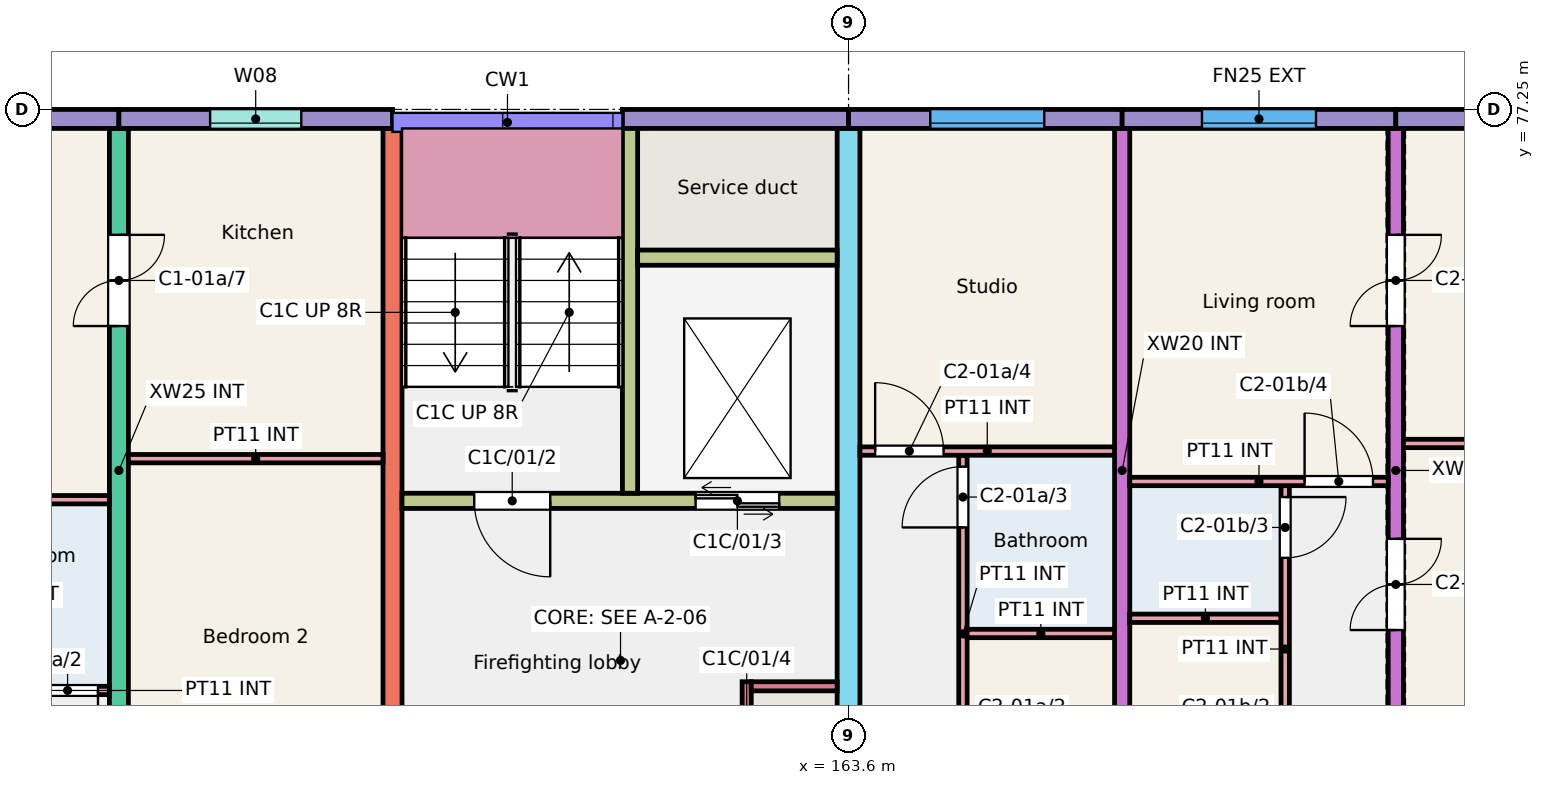
"""IFC4 building model, lengths in metres.
Left out: names, types, materials, properties, quantities, classifications, styles, units other than length and angle.
Written with IfcOpenShell. Run it as: python <this file> out.ifc"""

import sys

from ifc_helpers import new_model, si_unit, direction, frame, frame_2d, origin, place, context, subcontext, project, spatial, rectangle, extrude, element, fill, save


model = new_model("IFC4")
c1 = context("Model", 3, precision=1e-05, world=origin(), true_north=direction((0.0, 1.0)))
c2 = subcontext(c1, "Body", "Model", "MODEL_VIEW")
j1 = project(units=[si_unit("LENGTHUNIT", "METRE"), si_unit("PLANEANGLEUNIT", "RADIAN")], contexts=[c1])
p1 = place(None, origin())
s1 = spatial("IfcSite", under=j1, at=p1, CompositionType="ELEMENT")
p2 = place(p1, origin())
s2 = spatial("IfcBuilding", under=s1, at=p2, CompositionType="ELEMENT")
p3 = place(p2, frame((0.0, 0.0, 3.0)))
s3 = spatial("IfcBuildingStorey", under=s2, at=p3, CompositionType="ELEMENT", Elevation=3.0)
p4 = place(p3, frame((154.0, 68.0, 0.0), z_axis=(0.0, 0.0, 1.0), x_axis=(0.0, 1.0, 0.0)))
e1 = element("IfcWall", 1, at=p4, inside=s3, PredefinedType="SHEAR", context=c2, shape_type="SweptSolid", body=[
    extrude(rectangle(XDim=9.0, YDim=0.25, at=frame_2d((4.5, 0.0))), origin(), (0.0, 0.0, 1.0), 3.0),
])
p5 = place(p4, frame((0.175, 0.0, 0.0)))
e2 = element("IfcOpeningElement", 2, at=p5, cuts=e1, PredefinedType="OPENING", context=c2, shape_type="SweptSolid", body=[
    extrude(rectangle(XDim=1.2, YDim=2.1, at=frame_2d((0.6, 1.05))), frame((0.0, 0.135, 0.0), z_axis=(0.0, -1.0, 0.0), x_axis=(1.0, 0.0, 0.0)), (0.0, 0.0, 1.0), 0.27),
])
p6 = place(p4, frame((6.4, 0.0, 0.0)))
e3 = element("IfcOpeningElement", 3, at=p6, cuts=e1, PredefinedType="OPENING", context=c2, shape_type="SweptSolid", body=[
    extrude(rectangle(XDim=1.2, YDim=2.1, at=frame_2d((0.6, 1.05))), frame((0.0, 0.135, 0.0), z_axis=(0.0, -1.0, 0.0), x_axis=(1.0, 0.0, 0.0)), (0.0, 0.0, 1.0), 0.27),
])
p7 = place(p3, frame((157.6, 68.0, 0.0), z_axis=(0.0, 0.0, 1.0), x_axis=(0.0, 1.0, 0.0)))
e4 = element("IfcWall", 4, at=p7, inside=s3, PredefinedType="SHEAR", context=c2, shape_type="SweptSolid", body=[
    extrude(rectangle(XDim=9.0, YDim=0.25, at=frame_2d((4.5, 0.0))), origin(), (0.0, 0.0, 1.0), 3.0),
])
p8 = place(p3, frame((163.6, 66.0, 0.0), z_axis=(0.0, 0.0, 1.0), x_axis=(0.0, 1.0, 0.0)))
e5 = element("IfcWall", 5, at=p8, inside=s3, PredefinedType="SHEAR", context=c2, shape_type="SweptSolid", body=[
    extrude(rectangle(XDim=11.0, YDim=0.3, at=frame_2d((5.5, 0.0))), origin(), (0.0, 0.0, 1.0), 3.0),
])
p9 = place(p8, frame((0.3, 0.0, 0.0)))
e6 = element("IfcOpeningElement", 6, at=p9, cuts=e5, PredefinedType="OPENING", context=c2, shape_type="SweptSolid", body=[
    extrude(rectangle(XDim=1.2, YDim=2.1, at=frame_2d((0.6, 1.05))), frame((0.0, 0.16, 0.0), z_axis=(0.0, -1.0, 0.0), x_axis=(1.0, 0.0, 0.0)), (0.0, 0.0, 1.0), 0.32),
])
p10 = place(p3, frame((167.2, 68.0, 0.0), z_axis=(0.0, 0.0, 1.0), x_axis=(0.0, 1.0, 0.0)))
e7 = element("IfcWall", 7, at=p10, inside=s3, PredefinedType="SHEAR", context=c2, shape_type="SweptSolid", body=[
    extrude(rectangle(XDim=9.0, YDim=0.2, at=frame_2d((4.5, 0.0))), origin(), (0.0, 0.0, 1.0), 3.0),
])
p11 = place(p3, frame((170.8, 68.0, 0.0), z_axis=(0.0, 0.0, 1.0), x_axis=(0.0, 1.0, 0.0)))
e8 = element("IfcWall", 8, at=p11, inside=s3, PredefinedType="SHEAR", context=c2, shape_type="SweptSolid", body=[
    extrude(rectangle(XDim=9.0, YDim=0.2, at=frame_2d((4.5, 0.0))), origin(), (0.0, 0.0, 1.0), 3.0),
])
p12 = place(p11, frame((2.4, 0.0, 0.0)))
e9 = element("IfcOpeningElement", 9, at=p12, cuts=e8, PredefinedType="OPENING", context=c2, shape_type="SweptSolid", body=[
    extrude(rectangle(XDim=1.2, YDim=2.1, at=frame_2d((0.6, 1.05))), frame((0.0, 0.11, 0.0), z_axis=(0.0, -1.0, 0.0), x_axis=(1.0, 0.0, 0.0)), (0.0, 0.0, 1.0), 0.22),
])
p13 = place(p11, frame((6.4, 0.0, 0.0)))
e10 = element("IfcOpeningElement", 10, at=p13, cuts=e8, PredefinedType="OPENING", context=c2, shape_type="SweptSolid", body=[
    extrude(rectangle(XDim=1.2, YDim=2.1, at=frame_2d((0.6, 1.05))), frame((0.0, 0.11, 0.0), z_axis=(0.0, -1.0, 0.0), x_axis=(1.0, 0.0, 0.0)), (0.0, 0.0, 1.0), 0.22),
])
p14 = place(p3, frame((150.4, 77.125, 0.0), z_axis=(0.0, 0.0, 1.0), x_axis=(1.0, 0.0, 0.0)))
e11 = element("IfcWall", 11, at=p14, inside=s3, PredefinedType="SOLIDWALL", context=c2, shape_type="SweptSolid", body=[
    extrude(rectangle(XDim=3.6, YDim=0.25, at=frame_2d((1.8, 0.0))), origin(), (0.0, 0.0, 1.0), 3.0),
])
p15 = place(p14, frame((1.038, 0.0, 0.9)))
e12 = element("IfcOpeningElement", 12, at=p15, cuts=e11, PredefinedType="OPENING", context=c2, shape_type="SweptSolid", body=[
    extrude(rectangle(XDim=1.5, YDim=1.5, at=frame_2d((0.75, 0.75))), frame((0.0, 0.135, 0.0), z_axis=(0.0, -1.0, 0.0), x_axis=(1.0, 0.0, 0.0)), (0.0, 0.0, 1.0), 0.27),
])
p16 = place(p3, frame((154.0, 77.125, 0.0), z_axis=(0.0, 0.0, 1.0), x_axis=(1.0, 0.0, 0.0)))
e13 = element("IfcWall", 13, at=p16, inside=s3, PredefinedType="SOLIDWALL", context=c2, shape_type="SweptSolid", body=[
    extrude(rectangle(XDim=3.6, YDim=0.25, at=frame_2d((1.8, 0.0))), origin(), (0.0, 0.0, 1.0), 3.0),
])
p17 = place(p16, frame((1.2, 0.0, 1.1)))
e14 = element("IfcOpeningElement", 14, at=p17, cuts=e13, PredefinedType="OPENING", context=c2, shape_type="SweptSolid", body=[
    extrude(rectangle(XDim=1.2, YDim=1.3, at=frame_2d((0.6, 0.65))), frame((0.0, 0.135, 0.0), z_axis=(0.0, -1.0, 0.0), x_axis=(1.0, 0.0, 0.0)), (0.0, 0.0, 1.0), 0.27),
])
p18 = place(p3, frame((160.625, 77.125, 0.0), z_axis=(0.0, 0.0, 1.0), x_axis=(1.0, 0.0, 0.0)))
e15 = element("IfcWall", 15, at=p18, inside=s3, PredefinedType="SOLIDWALL", context=c2, shape_type="SweptSolid", body=[
    extrude(rectangle(XDim=2.975, YDim=0.25, at=frame_2d((1.488, 0.0))), origin(), (0.0, 0.0, 1.0), 3.0),
])
p19 = place(p3, frame((157.725, 72.1, 0.0), z_axis=(0.0, 0.0, 1.0), x_axis=(1.0, 0.0, 0.0)))
e16 = element("IfcWall", 16, at=p19, inside=s3, PredefinedType="SHEAR", context=c2, shape_type="SweptSolid", body=[
    extrude(rectangle(XDim=5.725, YDim=0.2, at=frame_2d((2.862, 0.0))), origin(), (0.0, 0.0, 1.0), 3.0),
])
p20 = place(p19, frame((0.95, 0.0, 0.0)))
e17 = element("IfcOpeningElement", 17, at=p20, cuts=e16, PredefinedType="OPENING", context=c2, shape_type="SweptSolid", body=[
    extrude(rectangle(XDim=1.0, YDim=2.1, at=frame_2d((0.5, 1.05))), frame((0.0, 0.11, 0.0), z_axis=(0.0, -1.0, 0.0), x_axis=(1.0, 0.0, 0.0)), (0.0, 0.0, 1.0), 0.22),
])
p21 = place(p19, frame((3.863, 0.0, 0.0)))
e18 = element("IfcOpeningElement", 18, at=p21, cuts=e16, PredefinedType="OPENING", context=c2, shape_type="SweptSolid", body=[
    extrude(rectangle(XDim=1.1, YDim=2.1, at=frame_2d((0.55, 1.05))), frame((0.0, 0.11, 0.0), z_axis=(0.0, -1.0, 0.0), x_axis=(1.0, 0.0, 0.0)), (0.0, 0.0, 1.0), 0.22),
])
p22 = place(p3, frame((160.725, 72.2, 0.0), z_axis=(0.0, 0.0, 1.0), x_axis=(0.0, 1.0, 0.0)))
e19 = element("IfcWall", 19, at=p22, inside=s3, PredefinedType="SHEAR", context=c2, shape_type="SweptSolid", body=[
    extrude(rectangle(XDim=4.8, YDim=0.2, at=frame_2d((2.4, 0.0))), origin(), (0.0, 0.0, 1.0), 3.0),
])
p23 = place(p3, frame((160.825, 75.3, 0.0), z_axis=(0.0, 0.0, 1.0), x_axis=(1.0, 0.0, 0.0)))
e20 = element("IfcWall", 20, at=p23, inside=s3, PredefinedType="SHEAR", context=c2, shape_type="SweptSolid", body=[
    extrude(rectangle(XDim=2.625, YDim=0.2, at=frame_2d((1.312, 0.0))), origin(), (0.0, 0.0, 1.0), 3.0),
])
p24 = place(p3, frame((162.26, 68.0, 0.0), z_axis=(0.0, 0.0, 1.0), x_axis=(0.0, 1.0, 0.0)))
e21 = element("IfcWall", 21, at=p24, inside=s3, PredefinedType="SHEAR", context=c2, shape_type="SweptSolid", body=[
    extrude(rectangle(XDim=1.72, YDim=0.12, at=frame_2d((0.86, 0.0))), origin(), (0.0, 0.0, 1.0), 3.0),
])
p25 = place(p24, frame((0.45, 0.0, 0.0)))
e22 = element("IfcOpeningElement", 22, at=p25, cuts=e21, PredefinedType="OPENING", context=c2, shape_type="SweptSolid", body=[
    extrude(rectangle(XDim=0.9, YDim=2.1, at=frame_2d((0.45, 1.05))), frame((0.0, 0.07, 0.0), z_axis=(0.0, -1.0, 0.0), x_axis=(1.0, 0.0, 0.0)), (0.0, 0.0, 1.0), 0.14),
])
p26 = place(p3, frame((162.32, 69.66, 0.0), z_axis=(0.0, 0.0, 1.0), x_axis=(1.0, 0.0, 0.0)))
e23 = element("IfcWall", 23, at=p26, inside=s3, PredefinedType="SHEAR", context=c2, shape_type="SweptSolid", body=[
    extrude(rectangle(XDim=1.13, YDim=0.12, at=frame_2d((0.565, 0.0))), origin(), (0.0, 0.0, 1.0), 3.0),
])
p27 = place(p3, frame((163.6, 77.125, 0.0), z_axis=(0.0, 0.0, 1.0), x_axis=(1.0, 0.0, 0.0)))
e24 = element("IfcWall", 24, at=p27, inside=s3, PredefinedType="SOLIDWALL", context=c2, shape_type="SweptSolid", body=[
    extrude(rectangle(XDim=3.6, YDim=0.25, at=frame_2d((1.8, 0.0))), origin(), (0.0, 0.0, 1.0), 3.0),
])
p28 = place(p27, frame((1.075, 0.0, 0.9)))
e25 = element("IfcOpeningElement", 25, at=p28, cuts=e24, PredefinedType="OPENING", context=c2, shape_type="SweptSolid", body=[
    extrude(rectangle(XDim=1.5, YDim=1.5, at=frame_2d((0.75, 0.75))), frame((0.0, 0.135, 0.0), z_axis=(0.0, -1.0, 0.0), x_axis=(1.0, 0.0, 0.0)), (0.0, 0.0, 1.0), 0.27),
])
p29 = place(p3, frame((167.2, 77.125, 0.0), z_axis=(0.0, 0.0, 1.0), x_axis=(1.0, 0.0, 0.0)))
e26 = element("IfcWall", 26, at=p29, inside=s3, PredefinedType="SOLIDWALL", context=c2, shape_type="SweptSolid", body=[
    extrude(rectangle(XDim=3.6, YDim=0.25, at=frame_2d((1.8, 0.0))), origin(), (0.0, 0.0, 1.0), 3.0),
])
p30 = place(p29, frame((1.05, 0.0, 0.9)))
e27 = element("IfcOpeningElement", 27, at=p30, cuts=e26, PredefinedType="OPENING", context=c2, shape_type="SweptSolid", body=[
    extrude(rectangle(XDim=1.5, YDim=1.5, at=frame_2d((0.75, 0.75))), frame((0.0, 0.135, 0.0), z_axis=(0.0, -1.0, 0.0), x_axis=(1.0, 0.0, 0.0)), (0.0, 0.0, 1.0), 0.27),
])
p31 = place(p3, frame((170.8, 77.125, 0.0), z_axis=(0.0, 0.0, 1.0), x_axis=(1.0, 0.0, 0.0)))
e28 = element("IfcWall", 28, at=p31, inside=s3, PredefinedType="SOLIDWALL", context=c2, shape_type="SweptSolid", body=[
    extrude(rectangle(XDim=3.6, YDim=0.25, at=frame_2d((1.8, 0.0))), origin(), (0.0, 0.0, 1.0), 3.0),
])
p32 = place(p31, frame((1.038, 0.0, 0.9)))
e29 = element("IfcOpeningElement", 29, at=p32, cuts=e28, PredefinedType="OPENING", context=c2, shape_type="SweptSolid", body=[
    extrude(rectangle(XDim=1.5, YDim=1.5, at=frame_2d((0.75, 0.75))), frame((0.0, 0.135, 0.0), z_axis=(0.0, -1.0, 0.0), x_axis=(1.0, 0.0, 0.0)), (0.0, 0.0, 1.0), 0.27),
])
p33 = place(p3, frame((151.8, 69.605, 0.0), z_axis=(0.0, 0.0, 1.0), x_axis=(1.0, 0.0, 0.0)))
e30 = element("IfcWall", 30, at=p33, inside=s3, PredefinedType="PARTITIONING", context=c2, shape_type="SweptSolid", body=[
    extrude(rectangle(XDim=2.075, YDim=0.11, at=frame_2d((1.038, 0.0))), origin(), (0.0, 0.0, 1.0), 2.8),
])
p34 = place(p33, frame((1.125, 0.0, 0.0)))
e31 = element("IfcOpeningElement", 31, at=p34, cuts=e30, PredefinedType="OPENING", context=c2, shape_type="SweptSolid", body=[
    extrude(rectangle(XDim=0.8, YDim=2.1, at=frame_2d((0.4, 1.05))), frame((0.0, 0.065, 0.0), z_axis=(0.0, -1.0, 0.0), x_axis=(1.0, 0.0, 0.0)), (0.0, 0.0, 1.0), 0.13),
])
p35 = place(p3, frame((150.5, 72.115, 0.0), z_axis=(0.0, 0.0, 1.0), x_axis=(1.0, 0.0, 0.0)))
e32 = element("IfcWall", 32, at=p35, inside=s3, PredefinedType="PARTITIONING", context=c2, shape_type="SweptSolid", body=[
    extrude(rectangle(XDim=3.375, YDim=0.11, at=frame_2d((1.688, 0.0))), origin(), (0.0, 0.0, 1.0), 2.8),
])
p36 = place(p35, frame((0.2, 0.0, 0.0)))
e33 = element("IfcOpeningElement", 33, at=p36, cuts=e32, PredefinedType="OPENING", context=c2, shape_type="SweptSolid", body=[
    extrude(rectangle(XDim=0.9, YDim=2.1, at=frame_2d((0.45, 1.05))), frame((0.0, 0.065, 0.0), z_axis=(0.0, -1.0, 0.0), x_axis=(1.0, 0.0, 0.0)), (0.0, 0.0, 1.0), 0.13),
])
p37 = place(p3, frame((154.125, 72.655, 0.0), z_axis=(0.0, 0.0, 1.0), x_axis=(1.0, 0.0, 0.0)))
e34 = element("IfcWall", 34, at=p37, inside=s3, PredefinedType="PARTITIONING", context=c2, shape_type="SweptSolid", body=[
    extrude(rectangle(XDim=3.35, YDim=0.11, at=frame_2d((1.675, 0.0))), origin(), (0.0, 0.0, 1.0), 2.8),
])
p38 = place(p3, frame((165.105, 68.0, 0.0), z_axis=(0.0, 0.0, 1.0), x_axis=(0.0, 1.0, 0.0)))
e35 = element("IfcWall", 35, at=p38, inside=s3, PredefinedType="PARTITIONING", context=c2, shape_type="SweptSolid", body=[
    extrude(rectangle(XDim=4.7, YDim=0.11, at=frame_2d((2.35, 0.0))), origin(), (0.0, 0.0, 1.0), 2.8),
])
p39 = place(p38, frame((0.2, 0.0, 0.0)))
e36 = element("IfcOpeningElement", 36, at=p39, cuts=e35, PredefinedType="OPENING", context=c2, shape_type="SweptSolid", body=[
    extrude(rectangle(XDim=0.8, YDim=2.1, at=frame_2d((0.4, 1.05))), frame((0.0, 0.065, 0.0), z_axis=(0.0, -1.0, 0.0), x_axis=(1.0, 0.0, 0.0)), (0.0, 0.0, 1.0), 0.13),
])
p40 = place(p38, frame((3.75, 0.0, 0.0)))
e37 = element("IfcOpeningElement", 37, at=p40, cuts=e35, PredefinedType="OPENING", context=c2, shape_type="SweptSolid", body=[
    extrude(rectangle(XDim=0.8, YDim=2.1, at=frame_2d((0.4, 1.05))), frame((0.0, 0.065, 0.0), z_axis=(0.0, -1.0, 0.0), x_axis=(1.0, 0.0, 0.0)), (0.0, 0.0, 1.0), 0.13),
])
p41 = place(p3, frame((165.16, 70.355, 0.0), z_axis=(0.0, 0.0, 1.0), x_axis=(1.0, 0.0, 0.0)))
e38 = element("IfcWall", 38, at=p41, inside=s3, PredefinedType="PARTITIONING", context=c2, shape_type="SweptSolid", body=[
    extrude(rectangle(XDim=1.94, YDim=0.11, at=frame_2d((0.97, 0.0))), origin(), (0.0, 0.0, 1.0), 2.8),
])
p42 = place(p3, frame((163.75, 72.755, 0.0), z_axis=(0.0, 0.0, 1.0), x_axis=(1.0, 0.0, 0.0)))
e39 = element("IfcWall", 39, at=p42, inside=s3, PredefinedType="PARTITIONING", context=c2, shape_type="SweptSolid", body=[
    extrude(rectangle(XDim=3.35, YDim=0.11, at=frame_2d((1.675, 0.0))), origin(), (0.0, 0.0, 1.0), 2.8),
])
p43 = place(p42, frame((0.2, 0.0, 0.0)))
e40 = element("IfcOpeningElement", 40, at=p43, cuts=e39, PredefinedType="OPENING", context=c2, shape_type="SweptSolid", body=[
    extrude(rectangle(XDim=0.9, YDim=2.1, at=frame_2d((0.45, 1.05))), frame((0.0, 0.065, 0.0), z_axis=(0.0, -1.0, 0.0), x_axis=(1.0, 0.0, 0.0)), (0.0, 0.0, 1.0), 0.13),
])
p44 = place(p3, frame((167.3, 70.555, 0.0), z_axis=(0.0, 0.0, 1.0), x_axis=(1.0, 0.0, 0.0)))
e41 = element("IfcWall", 41, at=p44, inside=s3, PredefinedType="PARTITIONING", context=c2, shape_type="SweptSolid", body=[
    extrude(rectangle(XDim=1.99, YDim=0.11, at=frame_2d((0.995, 0.0))), origin(), (0.0, 0.0, 1.0), 2.8),
])
p45 = place(p3, frame((169.345, 68.0, 0.0), z_axis=(0.0, 0.0, 1.0), x_axis=(0.0, 1.0, 0.0)))
e42 = element("IfcWall", 42, at=p45, inside=s3, PredefinedType="PARTITIONING", context=c2, shape_type="SweptSolid", body=[
    extrude(rectangle(XDim=4.3, YDim=0.11, at=frame_2d((2.15, 0.0))), origin(), (0.0, 0.0, 1.0), 2.8),
])
p46 = place(p45, frame((0.2, 0.0, 0.0)))
e43 = element("IfcOpeningElement", 43, at=p46, cuts=e42, PredefinedType="OPENING", context=c2, shape_type="SweptSolid", body=[
    extrude(rectangle(XDim=0.8, YDim=2.1, at=frame_2d((0.4, 1.05))), frame((0.0, 0.065, 0.0), z_axis=(0.0, -1.0, 0.0), x_axis=(1.0, 0.0, 0.0)), (0.0, 0.0, 1.0), 0.13),
])
p47 = place(p45, frame((3.35, 0.0, 0.0)))
e44 = element("IfcOpeningElement", 44, at=p47, cuts=e42, PredefinedType="OPENING", context=c2, shape_type="SweptSolid", body=[
    extrude(rectangle(XDim=0.8, YDim=2.1, at=frame_2d((0.4, 1.05))), frame((0.0, 0.065, 0.0), z_axis=(0.0, -1.0, 0.0), x_axis=(1.0, 0.0, 0.0)), (0.0, 0.0, 1.0), 0.13),
])
p48 = place(p3, frame((167.3, 72.355, 0.0), z_axis=(0.0, 0.0, 1.0), x_axis=(1.0, 0.0, 0.0)))
e45 = element("IfcWall", 45, at=p48, inside=s3, PredefinedType="PARTITIONING", context=c2, shape_type="SweptSolid", body=[
    extrude(rectangle(XDim=3.4, YDim=0.11, at=frame_2d((1.7, 0.0))), origin(), (0.0, 0.0, 1.0), 2.8),
])
p49 = place(p48, frame((2.3, 0.0, 0.0)))
e46 = element("IfcOpeningElement", 46, at=p49, cuts=e45, PredefinedType="OPENING", context=c2, shape_type="SweptSolid", body=[
    extrude(rectangle(XDim=0.9, YDim=2.1, at=frame_2d((0.45, 1.05))), frame((0.0, 0.065, 0.0), z_axis=(0.0, -1.0, 0.0), x_axis=(1.0, 0.0, 0.0)), (0.0, 0.0, 1.0), 0.13),
])
p50 = place(p3, frame((170.9, 72.855, 0.0), z_axis=(0.0, 0.0, 1.0), x_axis=(1.0, 0.0, 0.0)))
e47 = element("IfcWall", 47, at=p50, inside=s3, PredefinedType="PARTITIONING", context=c2, shape_type="SweptSolid", body=[
    extrude(rectangle(XDim=3.375, YDim=0.11, at=frame_2d((1.688, 0.0))), origin(), (0.0, 0.0, 1.0), 2.8),
])
p51 = place(p17, origin())
e48 = element("IfcWindow", 48, at=p51, inside=s3, PartitioningType="SINGLE_PANEL", PredefinedType="WINDOW", context=c2, shape_type="SweptSolid", body=[
    extrude(rectangle(XDim=1.2, YDim=1.3, at=frame_2d((0.6, 0.65))), frame((0.0, -0.025, 0.0), z_axis=(0.0, -1.0, 0.0), x_axis=(1.0, 0.0, 0.0)), (0.0, 0.0, 1.0), 0.06),
])
fill(e14, e48)
p52 = place(p28, origin())
e49 = element("IfcWindow", 49, at=p52, inside=s3, PartitioningType="SINGLE_PANEL", PredefinedType="WINDOW", context=c2, shape_type="SweptSolid", body=[
    extrude(rectangle(XDim=1.5, YDim=1.5, at=frame_2d((0.75, 0.75))), frame((0.0, -0.025, 0.0), z_axis=(0.0, -1.0, 0.0), x_axis=(1.0, 0.0, 0.0)), (0.0, 0.0, 1.0), 0.06),
])
fill(e25, e49)
p53 = place(p30, origin())
e50 = element("IfcWindow", 50, at=p53, inside=s3, PartitioningType="SINGLE_PANEL", PredefinedType="WINDOW", context=c2, shape_type="SweptSolid", body=[
    extrude(rectangle(XDim=1.5, YDim=1.5, at=frame_2d((0.75, 0.75))), frame((0.0, -0.025, 0.0), z_axis=(0.0, -1.0, 0.0), x_axis=(1.0, 0.0, 0.0)), (0.0, 0.0, 1.0), 0.06),
])
fill(e27, e50)
p54 = place(p34, origin())
e51 = element("IfcDoor", 51, at=p54, inside=s3, OperationType="SINGLE_SWING_RIGHT", PredefinedType="DOOR", context=c2, shape_type="SweptSolid", body=[
    extrude(rectangle(XDim=0.8, YDim=2.1, at=frame_2d((0.4, 1.05))), frame((0.0, 0.025, 0.0), z_axis=(0.0, -1.0, 0.0), x_axis=(1.0, 0.0, 0.0)), (0.0, 0.0, 1.0), 0.05),
])
fill(e31, e51)
p55 = place(p6, origin())
e52 = element("IfcDoor", 52, at=p55, inside=s3, OperationType="DOUBLE_DOOR_SINGLE_SWING", PredefinedType="DOOR", context=c2, shape_type="SweptSolid", body=[
    extrude(rectangle(XDim=1.2, YDim=2.1, at=frame_2d((0.6, 1.05))), frame((0.0, 0.025, 0.0), z_axis=(0.0, -1.0, 0.0), x_axis=(1.0, 0.0, 0.0)), (0.0, 0.0, 1.0), 0.05),
])
fill(e3, e52)
p56 = place(p40, origin())
e53 = element("IfcDoor", 53, at=p56, inside=s3, OperationType="SINGLE_SWING_LEFT", PredefinedType="DOOR", context=c2, shape_type="SweptSolid", body=[
    extrude(rectangle(XDim=0.8, YDim=2.1, at=frame_2d((0.4, 1.05))), frame((0.0, 0.025, 0.0), z_axis=(0.0, -1.0, 0.0), x_axis=(1.0, 0.0, 0.0)), (0.0, 0.0, 1.0), 0.05),
])
fill(e37, e53)
p57 = place(p43, origin())
e54 = element("IfcDoor", 54, at=p57, inside=s3, OperationType="SINGLE_SWING_LEFT", PredefinedType="DOOR", context=c2, shape_type="SweptSolid", body=[
    extrude(rectangle(XDim=0.9, YDim=2.1, at=frame_2d((0.45, 1.05))), frame((0.0, 0.025, 0.0), z_axis=(0.0, -1.0, 0.0), x_axis=(1.0, 0.0, 0.0)), (0.0, 0.0, 1.0), 0.05),
])
fill(e40, e54)
p58 = place(p47, origin())
e55 = element("IfcDoor", 55, at=p58, inside=s3, OperationType="SINGLE_SWING_RIGHT", PredefinedType="DOOR", context=c2, shape_type="SweptSolid", body=[
    extrude(rectangle(XDim=0.8, YDim=2.1, at=frame_2d((0.4, 1.05))), frame((0.0, 0.025, 0.0), z_axis=(0.0, -1.0, 0.0), x_axis=(1.0, 0.0, 0.0)), (0.0, 0.0, 1.0), 0.05),
])
fill(e44, e55)
p59 = place(p49, origin())
e56 = element("IfcDoor", 56, at=p59, inside=s3, OperationType="SINGLE_SWING_LEFT", PredefinedType="DOOR", context=c2, shape_type="SweptSolid", body=[
    extrude(rectangle(XDim=0.9, YDim=2.1, at=frame_2d((0.45, 1.05))), frame((0.0, 0.025, 0.0), z_axis=(0.0, -1.0, 0.0), x_axis=(1.0, 0.0, 0.0)), (0.0, 0.0, 1.0), 0.05),
])
fill(e46, e56)
p60 = place(p12, origin())
e57 = element("IfcDoor", 57, at=p60, inside=s3, OperationType="DOUBLE_DOOR_SINGLE_SWING", PredefinedType="DOOR", context=c2, shape_type="SweptSolid", body=[
    extrude(rectangle(XDim=1.2, YDim=2.1, at=frame_2d((0.6, 1.05))), frame((0.0, 0.025, 0.0), z_axis=(0.0, -1.0, 0.0), x_axis=(1.0, 0.0, 0.0)), (0.0, 0.0, 1.0), 0.05),
])
fill(e9, e57)
p61 = place(p13, origin())
e58 = element("IfcDoor", 58, at=p61, inside=s3, OperationType="DOUBLE_DOOR_SINGLE_SWING", PredefinedType="DOOR", context=c2, shape_type="SweptSolid", body=[
    extrude(rectangle(XDim=1.2, YDim=2.1, at=frame_2d((0.6, 1.05))), frame((0.0, 0.025, 0.0), z_axis=(0.0, -1.0, 0.0), x_axis=(1.0, 0.0, 0.0)), (0.0, 0.0, 1.0), 0.05),
])
fill(e10, e58)
p62 = place(p20, origin())
e59 = element("IfcDoor", 59, at=p62, inside=s3, OperationType="SINGLE_SWING_RIGHT", PredefinedType="DOOR", context=c2, shape_type="SweptSolid", body=[
    extrude(rectangle(XDim=1.0, YDim=2.1, at=frame_2d((0.5, 1.05))), frame((0.0, 0.025, 0.0), z_axis=(0.0, -1.0, 0.0), x_axis=(1.0, 0.0, 0.0)), (0.0, 0.0, 1.0), 0.05),
])
fill(e17, e59)
p63 = place(p21, origin())
e60 = element("IfcDoor", 60, at=p63, inside=s3, OperationType="DOUBLE_DOOR_SLIDING", PredefinedType="DOOR", context=c2, shape_type="SweptSolid", body=[
    extrude(rectangle(XDim=1.1, YDim=2.1, at=frame_2d((0.55, 1.05))), frame((0.0, 0.025, 0.0), z_axis=(0.0, -1.0, 0.0), x_axis=(1.0, 0.0, 0.0)), (0.0, 0.0, 1.0), 0.05),
])
fill(e18, e60)
save(model, sys.argv[1])
